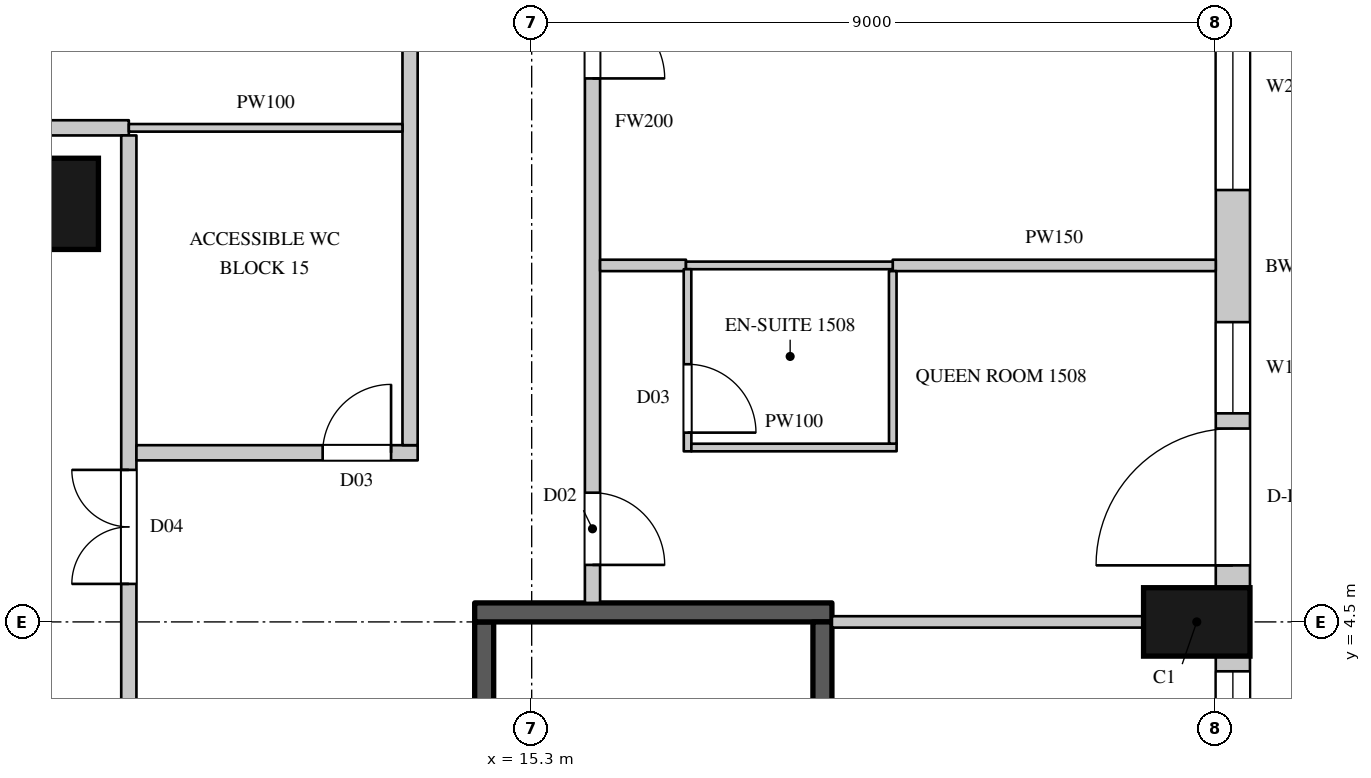
"""IFC4 building model, lengths in metres.
Left out: names, types, materials, properties, quantities, classifications, styles, units other than length and angle.
Written with IfcOpenShell. Run it as: python <this file> out.ifc"""

import sys

from ifc_helpers import new_model, si_unit, direction, frame, frame_2d, origin, origin_2d, place, context, subcontext, project, spatial, rectangle, circle, extrude, element, fill, save


model = new_model("IFC4")
c1 = context("Model", 3, precision=1e-05, world=origin(), true_north=direction((0.0, 1.0)))
c2 = subcontext(c1, "Body", "Model", "MODEL_VIEW")
j1 = project(units=[si_unit("LENGTHUNIT", "METRE"), si_unit("PLANEANGLEUNIT", "RADIAN")], contexts=[c1])
p1 = place(None, origin())
s1 = spatial("IfcSite", under=j1, at=p1, CompositionType="ELEMENT")
p2 = place(p1, origin())
s2 = spatial("IfcBuilding", under=s1, at=p2, CompositionType="ELEMENT")
p3 = place(p2, frame((0.0, 0.0, 84.3)))
s3 = spatial("IfcBuildingStorey", under=s2, at=p3, CompositionType="ELEMENT", Elevation=84.3)
p4 = place(p3, frame((24.05, 4.5, 0.0), z_axis=(0.0, 0.0, 1.0), x_axis=(0.0, 1.0, 0.0)))
e1 = element("IfcColumn", 1, at=p4, inside=s3, PredefinedType="COLUMN", context=c2, shape_type="SweptSolid", body=[
    extrude(rectangle(XDim=0.9, YDim=1.4, at=origin_2d()), origin(), (0.0, 0.0, 1.0), 3.6),
])
p5 = place(p3, frame((9.0, 10.0, 0.0), z_axis=(0.0, 0.0, 1.0), x_axis=(1.0, 0.0, 0.0)))
e2 = element("IfcColumn", 2, at=p5, inside=s3, PredefinedType="COLUMN", context=c2, shape_type="SweptSolid", body=[
    extrude(circle(Radius=0.6, at=origin_2d()), origin(), (0.0, 0.0, 1.0), 3.6),
])
p6 = place(p3, frame((24.525, -4.05, 0.0), z_axis=(0.0, 0.0, 1.0), x_axis=(0.0, 1.0, 0.0)))
e3 = element("IfcWall", 3, at=p6, inside=s3, PredefinedType="SOLIDWALL", context=c2, shape_type="SweptSolid", body=[
    extrude(rectangle(XDim=8.1, YDim=0.45, at=frame_2d((4.05, 0.0))), origin(), (0.0, 0.0, 1.0), 3.3),
])
p7 = place(p6, frame((0.2, 0.0, 0.0)))
e4 = element("IfcOpeningElement", 4, at=p7, cuts=e3, PredefinedType="OPENING", context=c2, shape_type="SweptSolid", body=[
    extrude(rectangle(XDim=1.8, YDim=2.4, at=frame_2d((0.9, 1.2))), frame((0.0, 0.235, 0.0), z_axis=(0.0, -1.0, 0.0), x_axis=(1.0, 0.0, 0.0)), (0.0, 0.0, 1.0), 0.47),
])
p8 = place(p6, frame((2.2, 0.0, 1.05)))
e5 = element("IfcOpeningElement", 5, at=p8, cuts=e3, PredefinedType="OPENING", context=c2, shape_type="SweptSolid", body=[
    extrude(rectangle(XDim=1.2, YDim=2.0, at=frame_2d((0.6, 1.0))), frame((0.0, 0.235, 0.0), z_axis=(0.0, -1.0, 0.0), x_axis=(1.0, 0.0, 0.0)), (0.0, 0.0, 1.0), 0.47),
])
p9 = place(p6, frame((4.7, 0.0, 0.0)))
e6 = element("IfcOpeningElement", 6, at=p9, cuts=e3, PredefinedType="OPENING", context=c2, shape_type="SweptSolid", body=[
    extrude(rectangle(XDim=1.8, YDim=2.4, at=frame_2d((0.9, 1.2))), frame((0.0, 0.235, 0.0), z_axis=(0.0, -1.0, 0.0), x_axis=(1.0, 0.0, 0.0)), (0.0, 0.0, 1.0), 0.47),
])
p10 = place(p6, frame((6.7, 0.0, 1.05)))
e7 = element("IfcOpeningElement", 7, at=p10, cuts=e3, PredefinedType="OPENING", context=c2, shape_type="SweptSolid", body=[
    extrude(rectangle(XDim=1.2, YDim=2.0, at=frame_2d((0.6, 1.0))), frame((0.0, 0.235, 0.0), z_axis=(0.0, -1.0, 0.0), x_axis=(1.0, 0.0, 0.0)), (0.0, 0.0, 1.0), 0.47),
])
p11 = place(p3, frame((24.525, 4.95, 0.0), z_axis=(0.0, 0.0, 1.0), x_axis=(0.0, 1.0, 0.0)))
e8 = element("IfcWall", 8, at=p11, inside=s3, PredefinedType="SOLIDWALL", context=c2, shape_type="SweptSolid", body=[
    extrude(rectangle(XDim=8.439, YDim=0.45, at=frame_2d((4.219, 0.0))), origin(), (0.0, 0.0, 1.0), 3.3),
])
p12 = place(p11, frame((0.294, 0.0, 0.0)))
e9 = element("IfcOpeningElement", 9, at=p12, cuts=e8, PredefinedType="OPENING", context=c2, shape_type="SweptSolid", body=[
    extrude(rectangle(XDim=1.8, YDim=2.4, at=frame_2d((0.9, 1.2))), frame((0.0, 0.235, 0.0), z_axis=(0.0, -1.0, 0.0), x_axis=(1.0, 0.0, 0.0)), (0.0, 0.0, 1.0), 0.47),
])
p13 = place(p11, frame((2.294, 0.0, 1.05)))
e10 = element("IfcOpeningElement", 10, at=p13, cuts=e8, PredefinedType="OPENING", context=c2, shape_type="SweptSolid", body=[
    extrude(rectangle(XDim=1.2, YDim=2.0, at=frame_2d((0.6, 1.0))), frame((0.0, 0.235, 0.0), z_axis=(0.0, -1.0, 0.0), x_axis=(1.0, 0.0, 0.0)), (0.0, 0.0, 1.0), 0.47),
])
p14 = place(p11, frame((5.232, 0.0, 1.05)))
e11 = element("IfcOpeningElement", 11, at=p14, cuts=e8, PredefinedType="OPENING", context=c2, shape_type="SweptSolid", body=[
    extrude(rectangle(XDim=2.7, YDim=2.0, at=frame_2d((1.35, 1.0))), frame((0.0, 0.235, 0.0), z_axis=(0.0, -1.0, 0.0), x_axis=(1.0, 0.0, 0.0)), (0.0, 0.0, 1.0), 0.47),
])
p15 = place(p3, frame((-7.9, 11.0, 0.0), z_axis=(0.0, 0.0, 1.0), x_axis=(1.0, 0.0, 0.0)))
e12 = element("IfcWall", 12, at=p15, inside=s3, PredefinedType="PARTITIONING", context=c2, shape_type="SweptSolid", body=[
    extrude(rectangle(XDim=17.9, YDim=0.2, at=frame_2d((8.95, 0.0))), origin(), (0.0, 0.0, 1.0), 3.3),
])
p16 = place(p15, frame((9.5, 0.0, 0.0)))
e13 = element("IfcOpeningElement", 13, at=p16, cuts=e12, PredefinedType="OPENING", context=c2, shape_type="SweptSolid", body=[
    extrude(rectangle(XDim=1.5, YDim=2.2, at=frame_2d((0.75, 1.1))), frame((0.0, 0.11, 0.0), z_axis=(0.0, -1.0, 0.0), x_axis=(1.0, 0.0, 0.0)), (0.0, 0.0, 1.0), 0.22),
])
p17 = place(p3, frame((10.0, -10.9, 0.0), z_axis=(0.0, 0.0, 1.0), x_axis=(0.0, 1.0, 0.0)))
e14 = element("IfcWall", 14, at=p17, inside=s3, PredefinedType="PARTITIONING", context=c2, shape_type="SweptSolid", body=[
    extrude(rectangle(XDim=21.8, YDim=0.2, at=frame_2d((10.9, 0.0))), origin(), (0.0, 0.0, 1.0), 3.3),
])
p18 = place(p17, frame((15.9, 0.0, 0.0)))
e15 = element("IfcOpeningElement", 15, at=p18, cuts=e14, PredefinedType="OPENING", context=c2, shape_type="SweptSolid", body=[
    extrude(rectangle(XDim=1.5, YDim=2.2, at=frame_2d((0.75, 1.1))), frame((0.0, 0.11, 0.0), z_axis=(0.0, -1.0, 0.0), x_axis=(1.0, 0.0, 0.0)), (0.0, 0.0, 1.0), 0.22),
])
p19 = place(p17, frame((8.75, 0.0, 0.0)))
e16 = element("IfcOpeningElement", 16, at=p19, cuts=e14, PredefinedType="OPENING", context=c2, shape_type="SweptSolid", body=[
    extrude(rectangle(XDim=1.5, YDim=2.2, at=frame_2d((0.75, 1.1))), frame((0.0, 0.11, 0.0), z_axis=(0.0, -1.0, 0.0), x_axis=(1.0, 0.0, 0.0)), (0.0, 0.0, 1.0), 0.22),
])
p20 = place(p3, frame((10.1, 6.725, 0.0), z_axis=(0.0, 0.0, 1.0), x_axis=(1.0, 0.0, 0.0)))
e17 = element("IfcWall", 17, at=p20, inside=s3, PredefinedType="PARTITIONING", context=c2, shape_type="SweptSolid", body=[
    extrude(rectangle(XDim=3.7, YDim=0.2, at=frame_2d((1.85, 0.0))), origin(), (0.0, 0.0, 1.0), 3.3),
])
p21 = place(p20, frame((2.45, 0.0, 0.0)))
e18 = element("IfcOpeningElement", 18, at=p21, cuts=e17, PredefinedType="OPENING", context=c2, shape_type="SweptSolid", body=[
    extrude(rectangle(XDim=0.9, YDim=2.2, at=frame_2d((0.45, 1.1))), frame((0.0, 0.11, 0.0), z_axis=(0.0, -1.0, 0.0), x_axis=(1.0, 0.0, 0.0)), (0.0, 0.0, 1.0), 0.22),
])
p22 = place(p3, frame((13.7, 6.825, 0.0), z_axis=(0.0, 0.0, 1.0), x_axis=(0.0, 1.0, 0.0)))
e19 = element("IfcWall", 19, at=p22, inside=s3, PredefinedType="PARTITIONING", context=c2, shape_type="SweptSolid", body=[
    extrude(rectangle(XDim=8.175, YDim=0.2, at=frame_2d((4.087, 0.0))), origin(), (0.0, 0.0, 1.0), 3.3),
])
p23 = place(p3, frame((16.1, 4.75, 0.0), z_axis=(0.0, 0.0, 1.0), x_axis=(0.0, 1.0, 0.0)))
e20 = element("IfcWall", 20, at=p23, inside=s3, PredefinedType="PARTITIONING", context=c2, shape_type="SweptSolid", body=[
    extrude(rectangle(XDim=12.65, YDim=0.2, at=frame_2d((6.325, 0.0))), origin(), (0.0, 0.0, 1.0), 3.3),
])
p24 = place(p23, frame((0.5, 0.0, 0.0)))
e21 = element("IfcOpeningElement", 21, at=p24, cuts=e20, PredefinedType="OPENING", context=c2, shape_type="SweptSolid", body=[
    extrude(rectangle(XDim=0.95, YDim=2.2, at=frame_2d((0.475, 1.1))), frame((0.0, 0.11, 0.0), z_axis=(0.0, -1.0, 0.0), x_axis=(1.0, 0.0, 0.0)), (0.0, 0.0, 1.0), 0.22),
])
p25 = place(p23, frame((6.9, 0.0, 0.0)))
e22 = element("IfcOpeningElement", 22, at=p25, cuts=e20, PredefinedType="OPENING", context=c2, shape_type="SweptSolid", body=[
    extrude(rectangle(XDim=0.95, YDim=2.2, at=frame_2d((0.475, 1.1))), frame((0.0, 0.11, 0.0), z_axis=(0.0, -1.0, 0.0), x_axis=(1.0, 0.0, 0.0)), (0.0, 0.0, 1.0), 0.22),
])
p26 = place(p3, frame((16.2, 9.19, 0.0), z_axis=(0.0, 0.0, 1.0), x_axis=(1.0, 0.0, 0.0)))
e23 = element("IfcWall", 23, at=p26, inside=s3, PredefinedType="PARTITIONING", context=c2, shape_type="SweptSolid", body=[
    extrude(rectangle(XDim=1.13, YDim=0.15, at=frame_2d((0.565, 0.0))), origin(), (0.0, 0.0, 1.0), 2.65),
])
p27 = place(p3, frame((19.25, 4.5, 0.0), z_axis=(0.0, 0.0, 1.0), x_axis=(1.0, 0.0, 0.0)))
e24 = element("IfcWall", 24, at=p27, inside=s3, PredefinedType="PARTITIONING", context=c2, shape_type="SweptSolid", body=[
    extrude(rectangle(XDim=4.1, YDim=0.15, at=frame_2d((2.05, 0.0))), origin(), (0.0, 0.0, 1.0), 3.3),
])
p28 = place(p3, frame((20.05, 9.19, 0.0), z_axis=(0.0, 0.0, 1.0), x_axis=(1.0, 0.0, 0.0)))
e25 = element("IfcWall", 25, at=p28, inside=s3, PredefinedType="PARTITIONING", context=c2, shape_type="SweptSolid", body=[
    extrude(rectangle(XDim=4.25, YDim=0.15, at=frame_2d((2.125, 0.0))), origin(), (0.0, 0.0, 1.0), 2.65),
])
p29 = place(p3, frame((14.675, -4.5, 0.0), z_axis=(0.0, 0.0, 1.0), x_axis=(0.0, 1.0, 0.0)))
e26 = element("IfcWall", 26, at=p29, inside=s3, PredefinedType="SHEAR", context=c2, shape_type="SweptSolid", body=[
    extrude(rectangle(XDim=9.0, YDim=0.25, at=frame_2d((4.5, 0.0))), origin(), (0.0, 0.0, 1.0), 3.3),
])
p30 = place(p29, frame((0.45, 0.0, 0.0)))
e27 = element("IfcOpeningElement", 27, at=p30, cuts=e26, PredefinedType="OPENING", context=c2, shape_type="SweptSolid", body=[
    extrude(rectangle(XDim=1.1, YDim=2.2, at=frame_2d((0.55, 1.1))), frame((0.0, 0.135, 0.0), z_axis=(0.0, -1.0, 0.0), x_axis=(1.0, 0.0, 0.0)), (0.0, 0.0, 1.0), 0.27),
])
p31 = place(p3, frame((14.55, 4.625, 0.0), z_axis=(0.0, 0.0, 1.0), x_axis=(1.0, 0.0, 0.0)))
e28 = element("IfcWall", 28, at=p31, inside=s3, PredefinedType="SHEAR", context=c2, shape_type="SweptSolid", body=[
    extrude(rectangle(XDim=4.7, YDim=0.25, at=frame_2d((2.35, 0.0))), origin(), (0.0, 0.0, 1.0), 3.3),
])
p32 = place(p3, frame((19.125, -4.5, 0.0), z_axis=(0.0, 0.0, 1.0), x_axis=(0.0, 1.0, 0.0)))
e29 = element("IfcWall", 29, at=p32, inside=s3, PredefinedType="SHEAR", context=c2, shape_type="SweptSolid", body=[
    extrude(rectangle(XDim=9.0, YDim=0.25, at=frame_2d((4.5, 0.0))), origin(), (0.0, 0.0, 1.0), 3.3),
])
p33 = place(p3, frame((10.0, 11.0, 0.0), z_axis=(0.0, 0.0, 1.0), x_axis=(1.0, 0.0, 0.0)))
e30 = element("IfcWall", 30, at=p33, inside=s3, PredefinedType="PARTITIONING", context=c2, shape_type="SweptSolid", body=[
    extrude(rectangle(XDim=3.6, YDim=0.1, at=frame_2d((1.8, 0.0))), origin(), (0.0, 0.0, 1.0), 3.3),
])
p34 = place(p3, frame((17.33, 9.19, 0.0), z_axis=(0.0, 0.0, 1.0), x_axis=(1.0, 0.0, 0.0)))
e31 = element("IfcWall", 31, at=p34, inside=s3, PredefinedType="PARTITIONING", context=c2, shape_type="SweptSolid", body=[
    extrude(rectangle(XDim=2.72, YDim=0.1, at=frame_2d((1.36, 0.0))), origin(), (0.0, 0.0, 1.0), 2.65),
])
p35 = place(p3, frame((17.35, 9.14, 0.0), z_axis=(0.0, 0.0, 1.0), x_axis=(0.000407580973, -0.999999916939, 0.0)))
e32 = element("IfcWall", 32, at=p35, inside=s3, PredefinedType="PARTITIONING", context=c2, shape_type="SweptSolid", body=[
    extrude(rectangle(XDim=2.396, YDim=0.1, at=frame_2d((1.198, 0.0))), origin(), (0.0, 0.0, 1.0), 3.3),
])
p36 = place(p35, frame((1.25, 0.0, 0.0)))
e33 = element("IfcOpeningElement", 33, at=p36, cuts=e32, PredefinedType="OPENING", context=c2, shape_type="SweptSolid", body=[
    extrude(rectangle(XDim=0.9, YDim=2.2, at=frame_2d((0.45, 1.1))), frame((0.0, 0.06, 0.0), z_axis=(0.0, -1.0, 0.0), x_axis=(1.0, 0.0, 0.0)), (0.0, 0.0, 1.0), 0.12),
])
p37 = place(p3, frame((17.401, 6.794, 0.0), z_axis=(0.0, 0.0, 1.0), x_axis=(0.9999999346, 0.000361663629, 0.0)))
e34 = element("IfcWall", 34, at=p37, inside=s3, PredefinedType="PARTITIONING", context=c2, shape_type="SweptSolid", body=[
    extrude(rectangle(XDim=2.7, YDim=0.1, at=frame_2d((1.35, 0.0))), origin(), (0.0, 0.0, 1.0), 3.3),
])
p38 = place(p3, frame((20.05, 9.115, 0.0), z_axis=(0.0, 0.0, 1.0), x_axis=(0.000430200003, -0.999999907464, 0.0)))
e35 = element("IfcWall", 35, at=p38, inside=s3, PredefinedType="PARTITIONING", context=c2, shape_type="SweptSolid", body=[
    extrude(rectangle(XDim=2.27, YDim=0.1, at=frame_2d((1.135, 0.0))), origin(), (0.0, 0.0, 1.0), 3.3),
])
p39 = place(p10, origin())
e36 = element("IfcWindow", 36, at=p39, inside=s3, PartitioningType="SINGLE_PANEL", PredefinedType="WINDOW", context=c2, shape_type="SweptSolid", body=[
    extrude(rectangle(XDim=1.2, YDim=2.0, at=frame_2d((0.6, 1.0))), frame((0.0, 0.135, 0.0), z_axis=(0.0, -1.0, 0.0), x_axis=(1.0, 0.0, 0.0)), (0.0, 0.0, 1.0), 0.06),
])
fill(e7, e36)
p40 = place(p12, origin())
e37 = element("IfcDoor", 37, at=p40, inside=s3, OperationType="SLIDING_TO_LEFT", PredefinedType="DOOR", context=c2, shape_type="SweptSolid", body=[
    extrude(rectangle(XDim=1.8, YDim=2.4, at=frame_2d((0.9, 1.2))), frame((0.0, 0.13, 0.0), z_axis=(0.0, -1.0, 0.0), x_axis=(1.0, 0.0, 0.0)), (0.0, 0.0, 1.0), 0.05),
])
fill(e9, e37)
p41 = place(p13, origin())
e38 = element("IfcWindow", 38, at=p41, inside=s3, PartitioningType="SINGLE_PANEL", PredefinedType="WINDOW", context=c2, shape_type="SweptSolid", body=[
    extrude(rectangle(XDim=1.2, YDim=2.0, at=frame_2d((0.6, 1.0))), frame((0.0, 0.135, 0.0), z_axis=(0.0, -1.0, 0.0), x_axis=(1.0, 0.0, 0.0)), (0.0, 0.0, 1.0), 0.06),
])
fill(e10, e38)
p42 = place(p14, origin())
e39 = element("IfcWindow", 39, at=p42, inside=s3, PartitioningType="SINGLE_PANEL", PredefinedType="WINDOW", context=c2, shape_type="SweptSolid", body=[
    extrude(rectangle(XDim=2.7, YDim=2.0, at=frame_2d((1.35, 1.0))), frame((0.0, 0.135, 0.0), z_axis=(0.0, -1.0, 0.0), x_axis=(1.0, 0.0, 0.0)), (0.0, 0.0, 1.0), 0.06),
])
fill(e11, e39)
p43 = place(p18, origin())
e40 = element("IfcDoor", 40, at=p43, inside=s3, OperationType="DOUBLE_DOOR_SINGLE_SWING", PredefinedType="DOOR", context=c2, shape_type="SweptSolid", body=[
    extrude(rectangle(XDim=1.5, YDim=2.2, at=frame_2d((0.75, 1.1))), frame((0.0, 0.025, 0.0), z_axis=(0.0, -1.0, 0.0), x_axis=(1.0, 0.0, 0.0)), (0.0, 0.0, 1.0), 0.05),
])
fill(e15, e40)
p44 = place(p21, origin())
e41 = element("IfcDoor", 41, at=p44, inside=s3, OperationType="SINGLE_SWING_RIGHT", PredefinedType="DOOR", context=c2, shape_type="SweptSolid", body=[
    extrude(rectangle(XDim=0.9, YDim=2.2, at=frame_2d((0.45, 1.1))), frame((0.0, 0.025, 0.0), z_axis=(0.0, -1.0, 0.0), x_axis=(1.0, 0.0, 0.0)), (0.0, 0.0, 1.0), 0.05),
])
fill(e18, e41)
p45 = place(p24, origin())
e42 = element("IfcDoor", 42, at=p45, inside=s3, OperationType="SINGLE_SWING_RIGHT", PredefinedType="DOOR", context=c2, shape_type="SweptSolid", body=[
    extrude(rectangle(XDim=0.95, YDim=2.2, at=frame_2d((0.475, 1.1))), frame((0.0, 0.025, 0.0), z_axis=(0.0, -1.0, 0.0), x_axis=(1.0, 0.0, 0.0)), (0.0, 0.0, 1.0), 0.05),
])
fill(e21, e42)
p46 = place(p36, origin())
e43 = element("IfcDoor", 43, at=p46, inside=s3, OperationType="SINGLE_SWING_RIGHT", PredefinedType="DOOR", context=c2, shape_type="SweptSolid", body=[
    extrude(rectangle(XDim=0.9, YDim=2.2, at=frame_2d((0.45, 1.1))), frame((0.0, 0.025, 0.0), z_axis=(0.0, -1.0, 0.0), x_axis=(1.0, 0.0, 0.0)), (0.0, 0.0, 1.0), 0.05),
])
fill(e33, e43)
p47 = place(p25, origin())
e44 = element("IfcDoor", 44, at=p47, inside=s3, OperationType="SINGLE_SWING_RIGHT", PredefinedType="DOOR", context=c2, shape_type="SweptSolid", body=[
    extrude(rectangle(XDim=0.95, YDim=2.2, at=frame_2d((0.475, 1.1))), frame((0.0, 0.025, 0.0), z_axis=(0.0, -1.0, 0.0), x_axis=(1.0, 0.0, 0.0)), (0.0, 0.0, 1.0), 0.05),
])
fill(e22, e44)
save(model, sys.argv[1])
